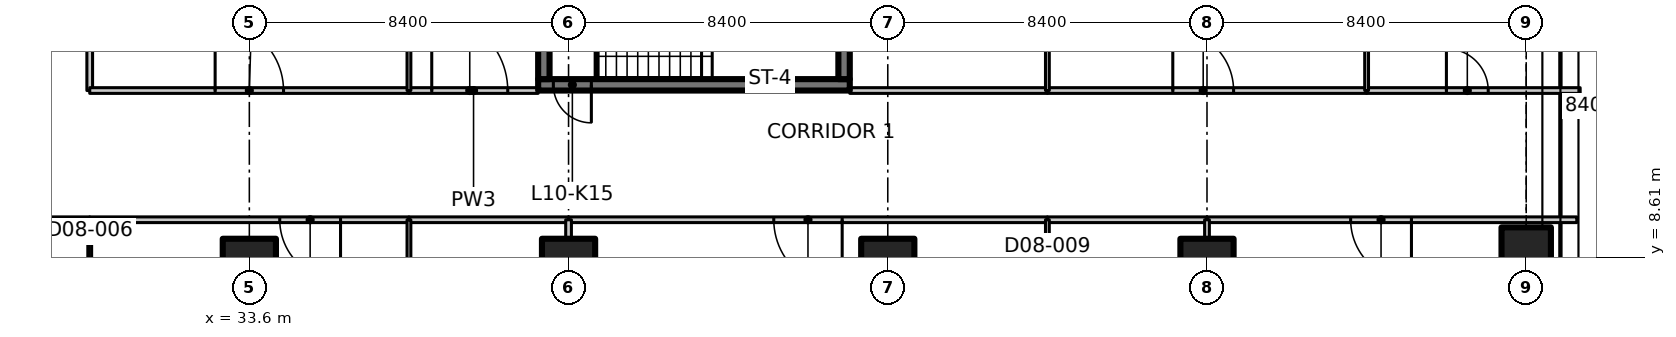
"""IFC4 building model, lengths in metres.
Left out: names, types, materials, properties, quantities, classifications, styles, units other than length and angle.
Written with IfcOpenShell. Run it as: python <this file> out.ifc"""

import sys

from ifc_helpers import new_model, si_unit, direction, frame, frame_2d, origin, origin_2d, place, context, subcontext, project, spatial, polyline, rectangle, outline, extrude, element, fill, save


model = new_model("IFC4")
c1 = context("Model", 3, precision=1e-05, world=origin(), true_north=direction((0.0, 1.0)))
c2 = subcontext(c1, "Body", "Model", "MODEL_VIEW")
j1 = project(units=[si_unit("LENGTHUNIT", "METRE"), si_unit("PLANEANGLEUNIT", "RADIAN")], contexts=[c1])
p1 = place(None, origin())
s1 = spatial("IfcSite", under=j1, at=p1, CompositionType="ELEMENT")
p2 = place(p1, origin())
s2 = spatial("IfcBuilding", under=s1, at=p2, CompositionType="ELEMENT")
p3 = place(p2, frame((0.0, 0.0, 50.9)))
s3 = spatial("IfcBuildingStorey", under=s2, at=p3, CompositionType="ELEMENT", Elevation=50.9)
for number, where, z_axis, x_axis in (
    (1, (33.6, 8.4, 0.0), (0.0, 0.0, 1.0), (1.0, 0.0, 0.0)),
    (2, (42.0, 8.4, 0.0), (0.0, 0.0, 1.0), (1.0, 0.0, 0.0)),
    (3, (50.4, 8.4, 0.0), (0.0, 0.0, 1.0), (1.0, 0.0, 0.0)),
    (4, (58.8, 8.4, 0.0), (0.0, 0.0, 1.0), (1.0, 0.0, 0.0)),
):
    element("IfcColumn", number, at=place(p3, frame(where, z_axis=z_axis, x_axis=x_axis)), inside=s3, PredefinedType="COLUMN", context=c2, shape_type="SweptSolid", body=[
        extrude(rectangle(XDim=1.4, YDim=1.4, at=origin_2d()), origin(), (0.0, 0.0, 1.0), 3.35),
    ])
p4 = place(p3, frame((67.2, 8.4, 0.0), z_axis=(0.0, 0.0, 1.0), x_axis=(1.0, 0.0, 0.0)))
e5 = element("IfcColumn", 5, at=p4, inside=s3, PredefinedType="COLUMN", context=c2, shape_type="SweptSolid", body=[
    extrude(rectangle(XDim=1.3, YDim=2.0, at=origin_2d()), origin(), (0.0, 0.0, 1.0), 3.35),
])
p5 = place(p3, frame((49.4, 13.15, 0.0), z_axis=(0.0, 0.0, 1.0), x_axis=(-1.0, 0.0, 0.0)))
e6 = element("IfcWall", 6, at=p5, inside=s3, PredefinedType="SHEAR", context=c2, shape_type="SweptSolid", body=[
    extrude(rectangle(XDim=8.2, YDim=0.3, at=frame_2d((4.1, 0.0))), origin(), (0.0, 0.0, 1.0), 3.35),
])
p6 = place(p5, frame((6.8, 0.0, 0.0)))
e7 = element("IfcOpeningElement", 7, at=p6, cuts=e6, PredefinedType="OPENING", context=c2, shape_type="SweptSolid", body=[
    extrude(rectangle(XDim=1.0, YDim=2.1, at=frame_2d((0.5, 1.05))), frame((0.0, 0.16, 0.0), z_axis=(0.0, -1.0, 0.0), x_axis=(1.0, 0.0, 0.0)), (0.0, 0.0, 1.0), 0.32),
])
for number, where, z_axis, x_axis in (
    (8, (41.35, 13.3, 0.0), (0.0, 0.0, 1.0), (0.0, 1.0, 0.0)),
    (9, (49.25, 13.3, 0.0), (0.0, 0.0, 1.0), (0.0, 1.0, 0.0)),
):
    element("IfcWall", number, at=place(p3, frame(where, z_axis=z_axis, x_axis=x_axis)), inside=s3, PredefinedType="SHEAR", context=c2, shape_type="SweptSolid", body=[
        extrude(rectangle(XDim=2.55, YDim=0.3, at=frame_2d((1.275, 0.0))), origin(), (0.0, 0.0, 1.0), 3.35),
    ])
p7 = place(p3, frame((29.4, 9.6, 0.0), z_axis=(0.0, 0.0, 1.0), x_axis=(-1.0, 0.0, 0.0)))
e10 = element("IfcWall", 10, at=p7, inside=s3, PredefinedType="PARTITIONING", context=c2, shape_type="SweptSolid", body=[
    extrude(rectangle(XDim=4.2, YDim=0.15, at=frame_2d((2.1, 0.0))), origin(), (0.0, 0.0, 1.0), 3.33),
])
p8 = place(p3, frame((29.4, 21.2, 0.0), z_axis=(0.0, 0.0, 1.0), x_axis=(0.0, -1.0, 0.0)))
e11 = element("IfcWall", 11, at=p8, inside=s3, PredefinedType="PARTITIONING", context=c2, shape_type="SweptSolid", body=[
    extrude(rectangle(XDim=8.2, YDim=0.15, at=frame_2d((4.1, 0.0))), origin(), (0.0, 0.0, 1.0), 3.33),
])
p9 = place(p3, frame((37.8, 9.6, 0.0), z_axis=(0.0, 0.0, 1.0), x_axis=(-1.0, 0.0, 0.0)))
e12 = element("IfcWall", 12, at=p9, inside=s3, PredefinedType="PARTITIONING", context=c2, shape_type="SweptSolid", body=[
    extrude(rectangle(XDim=8.4, YDim=0.15, at=frame_2d((4.2, 0.0))), origin(), (0.0, 0.0, 1.0), 3.33),
])
p10 = place(p9, frame((1.8, 0.0, 0.0)))
e13 = element("IfcOpeningElement", 13, at=p10, cuts=e12, PredefinedType="OPENING", context=c2, shape_type="SweptSolid", body=[
    extrude(rectangle(XDim=1.6, YDim=2.1, at=frame_2d((0.8, 1.05))), frame((0.0, 0.085, 0.0), z_axis=(0.0, -1.0, 0.0), x_axis=(1.0, 0.0, 0.0)), (0.0, 0.0, 1.0), 0.17),
])
p11 = place(p3, frame((42.0, 9.6, 0.0), z_axis=(0.0, 0.0, 1.0), x_axis=(-1.0, 0.0, 0.0)))
e14 = element("IfcWall", 14, at=p11, inside=s3, PredefinedType="PARTITIONING", context=c2, shape_type="SweptSolid", body=[
    extrude(rectangle(XDim=4.2, YDim=0.15, at=frame_2d((2.1, 0.0))), origin(), (0.0, 0.0, 1.0), 3.33),
])
p12 = place(p3, frame((54.6, 9.6, 0.0), z_axis=(0.0, 0.0, 1.0), x_axis=(-1.0, 0.0, 0.0)))
e15 = element("IfcWall", 15, at=p12, inside=s3, PredefinedType="PARTITIONING", context=c2, shape_type="SweptSolid", body=[
    extrude(rectangle(XDim=12.6, YDim=0.15, at=frame_2d((6.3, 0.0))), origin(), (0.0, 0.0, 1.0), 3.33),
])
p13 = place(p12, frame((5.4, 0.0, 0.0)))
e16 = element("IfcOpeningElement", 16, at=p13, cuts=e15, PredefinedType="OPENING", context=c2, shape_type="SweptSolid", body=[
    extrude(rectangle(XDim=1.8, YDim=2.1, at=frame_2d((0.9, 1.05))), frame((0.0, 0.085, 0.0), z_axis=(0.0, -1.0, 0.0), x_axis=(1.0, 0.0, 0.0)), (0.0, 0.0, 1.0), 0.17),
])
p14 = place(p3, frame((58.8, 9.6, 0.0), z_axis=(0.0, 0.0, 1.0), x_axis=(-1.0, 0.0, 0.0)))
e17 = element("IfcWall", 17, at=p14, inside=s3, PredefinedType="PARTITIONING", context=c2, shape_type="SweptSolid", body=[
    extrude(rectangle(XDim=4.2, YDim=0.15, at=frame_2d((2.1, 0.0))), origin(), (0.0, 0.0, 1.0), 3.33),
])
p15 = place(p3, frame((68.531, 9.6, 0.0), z_axis=(0.0, 0.0, 1.0), x_axis=(-1.0, 0.0, 0.0)))
e18 = element("IfcWall", 18, at=p15, inside=s3, PredefinedType="PARTITIONING", context=c2, shape_type="SweptSolid", body=[
    extrude(outline(polyline([(0.0, 0.0), (9.73, 0.0), (9.73, 3.33), (1.781, 3.33), (1.779, 2.98), (0.883, 2.98), (0.881, 3.33), (0.25, 3.33), (0.0, 3.33), (0.0, 0.0)])), frame((0.0, 0.075, 0.0), z_axis=(0.0, -1.0, 0.0), x_axis=(1.0, 0.0, 0.0)), (0.0, 0.0, 1.0), 0.15),
])
p16 = place(p15, frame((4.351, 0.0, 0.0)))
e19 = element("IfcOpeningElement", 19, at=p16, cuts=e18, PredefinedType="OPENING", context=c2, shape_type="SweptSolid", body=[
    extrude(rectangle(XDim=1.6, YDim=2.1, at=frame_2d((0.8, 1.05))), frame((0.0, 0.085, 0.0), z_axis=(0.0, -1.0, 0.0), x_axis=(1.0, 0.0, 0.0)), (0.0, 0.0, 1.0), 0.17),
])
p17 = place(p3, frame((29.4, 13.0, 0.0), z_axis=(0.0, 0.0, 1.0), x_axis=(1.0, 0.0, 0.0)))
e20 = element("IfcWall", 20, at=p17, inside=s3, PredefinedType="PARTITIONING", context=c2, shape_type="SweptSolid", body=[
    extrude(rectangle(XDim=8.4, YDim=0.15, at=frame_2d((4.2, 0.0))), origin(), (0.0, 0.0, 1.0), 3.33),
])
p18 = place(p17, frame((3.3, 0.0, 0.0)))
e21 = element("IfcOpeningElement", 21, at=p18, cuts=e20, PredefinedType="OPENING", context=c2, shape_type="SweptSolid", body=[
    extrude(rectangle(XDim=1.8, YDim=2.1, at=frame_2d((0.9, 1.05))), frame((0.0, 0.085, 0.0), z_axis=(0.0, -1.0, 0.0), x_axis=(1.0, 0.0, 0.0)), (0.0, 0.0, 1.0), 0.17),
])
p19 = place(p3, frame((37.8, 13.0, 0.0), z_axis=(0.0, 0.0, 1.0), x_axis=(1.0, 0.0, 0.0)))
e22 = element("IfcWall", 22, at=p19, inside=s3, PredefinedType="PARTITIONING", context=c2, shape_type="SweptSolid", body=[
    extrude(rectangle(XDim=3.4, YDim=0.15, at=frame_2d((1.7, 0.0))), origin(), (0.0, 0.0, 1.0), 3.33),
])
p20 = place(p19, frame((0.6, 0.0, 0.0)))
e23 = element("IfcOpeningElement", 23, at=p20, cuts=e22, PredefinedType="OPENING", context=c2, shape_type="SweptSolid", body=[
    extrude(rectangle(XDim=2.0, YDim=2.4, at=frame_2d((1.0, 1.2))), frame((0.0, 0.085, 0.0), z_axis=(0.0, -1.0, 0.0), x_axis=(1.0, 0.0, 0.0)), (0.0, 0.0, 1.0), 0.17),
])
p21 = place(p3, frame((49.4, 13.0, 0.0), z_axis=(0.0, 0.0, 1.0), x_axis=(1.0, 0.0, 0.0)))
e24 = element("IfcWall", 24, at=p21, inside=s3, PredefinedType="PARTITIONING", context=c2, shape_type="SweptSolid", body=[
    extrude(rectangle(XDim=5.2, YDim=0.15, at=frame_2d((2.6, 0.0))), origin(), (0.0, 0.0, 1.0), 3.33),
])
p22 = place(p3, frame((54.6, 13.0, 0.0), z_axis=(0.0, 0.0, 1.0), x_axis=(1.0, 0.0, 0.0)))
e25 = element("IfcWall", 25, at=p22, inside=s3, PredefinedType="PARTITIONING", context=c2, shape_type="SweptSolid", body=[
    extrude(rectangle(XDim=8.4, YDim=0.15, at=frame_2d((4.2, 0.0))), origin(), (0.0, 0.0, 1.0), 3.33),
])
p23 = place(p22, frame((3.3, 0.0, 0.0)))
e26 = element("IfcOpeningElement", 26, at=p23, cuts=e25, PredefinedType="OPENING", context=c2, shape_type="SweptSolid", body=[
    extrude(rectangle(XDim=1.6, YDim=2.1, at=frame_2d((0.8, 1.05))), frame((0.0, 0.085, 0.0), z_axis=(0.0, -1.0, 0.0), x_axis=(1.0, 0.0, 0.0)), (0.0, 0.0, 1.0), 0.17),
])
p24 = place(p3, frame((63.0, 13.0, 0.0), z_axis=(0.0, 0.0, 1.0), x_axis=(1.0, 0.0, 0.0)))
e27 = element("IfcWall", 27, at=p24, inside=s3, PredefinedType="PARTITIONING", context=c2, shape_type="SweptSolid", body=[
    extrude(outline(polyline([(0.0, 0.0), (5.619, 0.0), (5.619, 3.33), (5.28, 3.33), (4.65, 3.33), (4.648, 2.98), (3.752, 2.98), (3.75, 3.33), (0.0, 3.33), (0.0, 0.0)])), frame((0.0, 0.075, 0.0), z_axis=(0.0, -1.0, 0.0), x_axis=(1.0, 0.0, 0.0)), (0.0, 0.0, 1.0), 0.15),
])
p25 = place(p24, frame((2.1, 0.0, 0.0)))
e28 = element("IfcOpeningElement", 28, at=p25, cuts=e27, PredefinedType="OPENING", context=c2, shape_type="SweptSolid", body=[
    extrude(rectangle(XDim=1.1, YDim=2.1, at=frame_2d((0.55, 1.05))), frame((0.0, 0.085, 0.0), z_axis=(0.0, -1.0, 0.0), x_axis=(1.0, 0.0, 0.0)), (0.0, 0.0, 1.0), 0.17),
])
p26 = place(p3, frame((37.8, 9.6, 0.0), z_axis=(0.0, 0.0, 1.0), x_axis=(0.0, -1.0, 0.0)))
e29 = element("IfcWall", 29, at=p26, inside=s3, PredefinedType="PARTITIONING", context=c2, shape_type="SweptSolid", body=[
    extrude(rectangle(XDim=5.4, YDim=0.1, at=frame_2d((2.7, 0.0))), origin(), (0.0, 0.0, 1.0), 3.33),
])
p27 = place(p26, frame((2.1, 0.0, 0.0)))
e30 = element("IfcOpeningElement", 30, at=p27, cuts=e29, PredefinedType="OPENING", context=c2, shape_type="SweptSolid", body=[
    extrude(rectangle(XDim=1.0, YDim=2.1, at=frame_2d((0.5, 1.05))), frame((0.0, 0.06, 0.0), z_axis=(0.0, -1.0, 0.0), x_axis=(1.0, 0.0, 0.0)), (0.0, 0.0, 1.0), 0.12),
])
p28 = place(p3, frame((29.4, 4.8, 0.0), z_axis=(0.0, 0.0, 1.0), x_axis=(0.0, 1.0, 0.0)))
e31 = element("IfcWall", 31, at=p28, inside=s3, PredefinedType="PARTITIONING", context=c2, shape_type="SweptSolid", body=[
    extrude(rectangle(XDim=4.8, YDim=0.1, at=frame_2d((2.4, 0.0))), origin(), (0.0, 0.0, 1.0), 3.33),
])
p29 = place(p28, frame((1.8, 0.0, 0.0)))
e32 = element("IfcOpeningElement", 32, at=p29, cuts=e31, PredefinedType="OPENING", context=c2, shape_type="SweptSolid", body=[
    extrude(rectangle(XDim=1.0, YDim=2.1, at=frame_2d((0.5, 1.05))), frame((0.0, 0.06, 0.0), z_axis=(0.0, -1.0, 0.0), x_axis=(1.0, 0.0, 0.0)), (0.0, 0.0, 1.0), 0.12),
])
p30 = place(p3, frame((42.0, 9.6, 0.0), z_axis=(0.0, 0.0, 1.0), x_axis=(0.0, -1.0, 0.0)))
e33 = element("IfcWall", 33, at=p30, inside=s3, PredefinedType="PARTITIONING", context=c2, shape_type="SweptSolid", body=[
    extrude(rectangle(XDim=0.48, YDim=0.15, at=frame_2d((0.24, 0.0))), origin(), (0.0, 0.0, 1.0), 3.33),
])
p31 = place(p3, frame((54.6, 9.6, 0.0), z_axis=(0.0, 0.0, 1.0), x_axis=(0.0, -1.0, 0.0)))
e34 = element("IfcWall", 34, at=p31, inside=s3, PredefinedType="PARTITIONING", context=c2, shape_type="SweptSolid", body=[
    extrude(rectangle(XDim=6.0, YDim=0.1, at=frame_2d((3.0, 0.0))), origin(), (0.0, 0.0, 1.0), 3.33),
])
p32 = place(p31, frame((2.4, 0.0, 0.0)))
e35 = element("IfcOpeningElement", 35, at=p32, cuts=e34, PredefinedType="OPENING", context=c2, shape_type="SweptSolid", body=[
    extrude(rectangle(XDim=1.0, YDim=2.1, at=frame_2d((0.5, 1.05))), frame((0.0, 0.06, 0.0), z_axis=(0.0, -1.0, 0.0), x_axis=(1.0, 0.0, 0.0)), (0.0, 0.0, 1.0), 0.12),
])
p33 = place(p3, frame((58.8, 9.6, 0.0), z_axis=(0.0, 0.0, 1.0), x_axis=(0.0, -1.0, 0.0)))
e36 = element("IfcWall", 36, at=p33, inside=s3, PredefinedType="PARTITIONING", context=c2, shape_type="SweptSolid", body=[
    extrude(rectangle(XDim=0.48, YDim=0.125, at=frame_2d((0.24, 0.0))), origin(), (0.0, 0.0, 1.0), 3.33),
])
p34 = place(p3, frame((37.8, 30.243, 0.0), z_axis=(0.0, 0.0, 1.0), x_axis=(0.0, -1.0, 0.0)))
e37 = element("IfcWall", 37, at=p34, inside=s3, PredefinedType="PARTITIONING", context=c2, shape_type="SweptSolid", body=[
    extrude(outline(polyline([(0.0, 0.0), (17.243, 0.0), (17.243, 3.33), (5.493, 3.33), (5.491, 2.98), (4.595, 2.98), (4.593, 3.33), (0.0, 3.33), (0.0, 0.0)])), frame((0.0, 0.05, 0.0), z_axis=(0.0, -1.0, 0.0), x_axis=(1.0, 0.0, 0.0)), (0.0, 0.0, 1.0), 0.1),
])
p35 = place(p3, frame((54.6, 26.374, 0.0), z_axis=(0.0, 0.0, 1.0), x_axis=(0.0, -1.0, 0.0)))
e38 = element("IfcWall", 38, at=p35, inside=s3, PredefinedType="PARTITIONING", context=c2, shape_type="SweptSolid", body=[
    extrude(outline(polyline([(0.0, 0.0), (13.374, 0.0), (13.374, 3.33), (1.624, 3.33), (1.622, 2.98), (0.726, 2.98), (0.724, 3.33), (0.074, 3.33), (0.0, 3.33), (0.0, 0.0)])), frame((0.0, 0.05, 0.0), z_axis=(0.0, -1.0, 0.0), x_axis=(1.0, 0.0, 0.0)), (0.0, 0.0, 1.0), 0.1),
])
p36 = place(p3, frame((63.0, 25.4, 0.0), z_axis=(0.0, 0.0, 1.0), x_axis=(0.0, -1.0, 0.0)))
e39 = element("IfcWall", 39, at=p36, inside=s3, PredefinedType="PARTITIONING", context=c2, shape_type="SweptSolid", body=[
    extrude(outline(polyline([(0.0, 0.0), (12.4, 0.0), (12.4, 3.33), (5.066, 3.33), (5.064, 2.98), (3.736, 2.98), (3.734, 3.33), (0.0, 3.33), (0.0, 0.0)])), frame((0.0, 0.05, 0.0), z_axis=(0.0, -1.0, 0.0), x_axis=(1.0, 0.0, 0.0)), (0.0, 0.0, 1.0), 0.1),
])
p37 = place(p6, origin())
e40 = element("IfcDoor", 40, at=p37, inside=s3, OperationType="SINGLE_SWING_LEFT", PredefinedType="DOOR", context=c2, shape_type="SweptSolid", body=[
    extrude(rectangle(XDim=1.0, YDim=2.1, at=frame_2d((0.5, 1.05))), frame((0.0, 0.025, 0.0), z_axis=(0.0, -1.0, 0.0), x_axis=(1.0, 0.0, 0.0)), (0.0, 0.0, 1.0), 0.05),
])
fill(e7, e40)
p38 = place(p10, origin())
e41 = element("IfcDoor", 41, at=p38, inside=s3, OperationType="DOUBLE_DOOR_SINGLE_SWING", PredefinedType="DOOR", context=c2, shape_type="SweptSolid", body=[
    extrude(rectangle(XDim=1.6, YDim=2.1, at=frame_2d((0.8, 1.05))), frame((0.0, 0.025, 0.0), z_axis=(0.0, -1.0, 0.0), x_axis=(1.0, 0.0, 0.0)), (0.0, 0.0, 1.0), 0.05),
])
fill(e13, e41)
p39 = place(p13, origin())
e42 = element("IfcDoor", 42, at=p39, inside=s3, OperationType="DOUBLE_DOOR_SINGLE_SWING", PredefinedType="DOOR", context=c2, shape_type="SweptSolid", body=[
    extrude(rectangle(XDim=1.8, YDim=2.1, at=frame_2d((0.9, 1.05))), frame((0.0, 0.025, 0.0), z_axis=(0.0, -1.0, 0.0), x_axis=(1.0, 0.0, 0.0)), (0.0, 0.0, 1.0), 0.05),
])
fill(e16, e42)
p40 = place(p16, origin())
e43 = element("IfcDoor", 43, at=p40, inside=s3, OperationType="DOUBLE_DOOR_SINGLE_SWING", PredefinedType="DOOR", context=c2, shape_type="SweptSolid", body=[
    extrude(rectangle(XDim=1.6, YDim=2.1, at=frame_2d((0.8, 1.05))), frame((0.0, 0.025, 0.0), z_axis=(0.0, -1.0, 0.0), x_axis=(1.0, 0.0, 0.0)), (0.0, 0.0, 1.0), 0.05),
])
fill(e19, e43)
p41 = place(p18, origin())
e44 = element("IfcDoor", 44, at=p41, inside=s3, OperationType="DOUBLE_DOOR_SINGLE_SWING", PredefinedType="DOOR", context=c2, shape_type="SweptSolid", body=[
    extrude(rectangle(XDim=1.8, YDim=2.1, at=frame_2d((0.9, 1.05))), frame((0.0, 0.025, 0.0), z_axis=(0.0, -1.0, 0.0), x_axis=(1.0, 0.0, 0.0)), (0.0, 0.0, 1.0), 0.05),
])
fill(e21, e44)
p42 = place(p20, origin())
e45 = element("IfcDoor", 45, at=p42, inside=s3, OperationType="DOUBLE_DOOR_SINGLE_SWING", PredefinedType="DOOR", context=c2, shape_type="SweptSolid", body=[
    extrude(rectangle(XDim=2.0, YDim=2.4, at=frame_2d((1.0, 1.2))), frame((0.0, 0.025, 0.0), z_axis=(0.0, -1.0, 0.0), x_axis=(1.0, 0.0, 0.0)), (0.0, 0.0, 1.0), 0.05),
])
fill(e23, e45)
p43 = place(p23, origin())
e46 = element("IfcDoor", 46, at=p43, inside=s3, OperationType="DOUBLE_DOOR_SINGLE_SWING", PredefinedType="DOOR", context=c2, shape_type="SweptSolid", body=[
    extrude(rectangle(XDim=1.6, YDim=2.1, at=frame_2d((0.8, 1.05))), frame((0.0, 0.025, 0.0), z_axis=(0.0, -1.0, 0.0), x_axis=(1.0, 0.0, 0.0)), (0.0, 0.0, 1.0), 0.05),
])
fill(e26, e46)
p44 = place(p25, origin())
e47 = element("IfcDoor", 47, at=p44, inside=s3, OperationType="SINGLE_SWING_LEFT", PredefinedType="DOOR", context=c2, shape_type="SweptSolid", body=[
    extrude(rectangle(XDim=1.1, YDim=2.1, at=frame_2d((0.55, 1.05))), frame((0.0, 0.025, 0.0), z_axis=(0.0, -1.0, 0.0), x_axis=(1.0, 0.0, 0.0)), (0.0, 0.0, 1.0), 0.05),
])
fill(e28, e47)
save(model, sys.argv[1])
